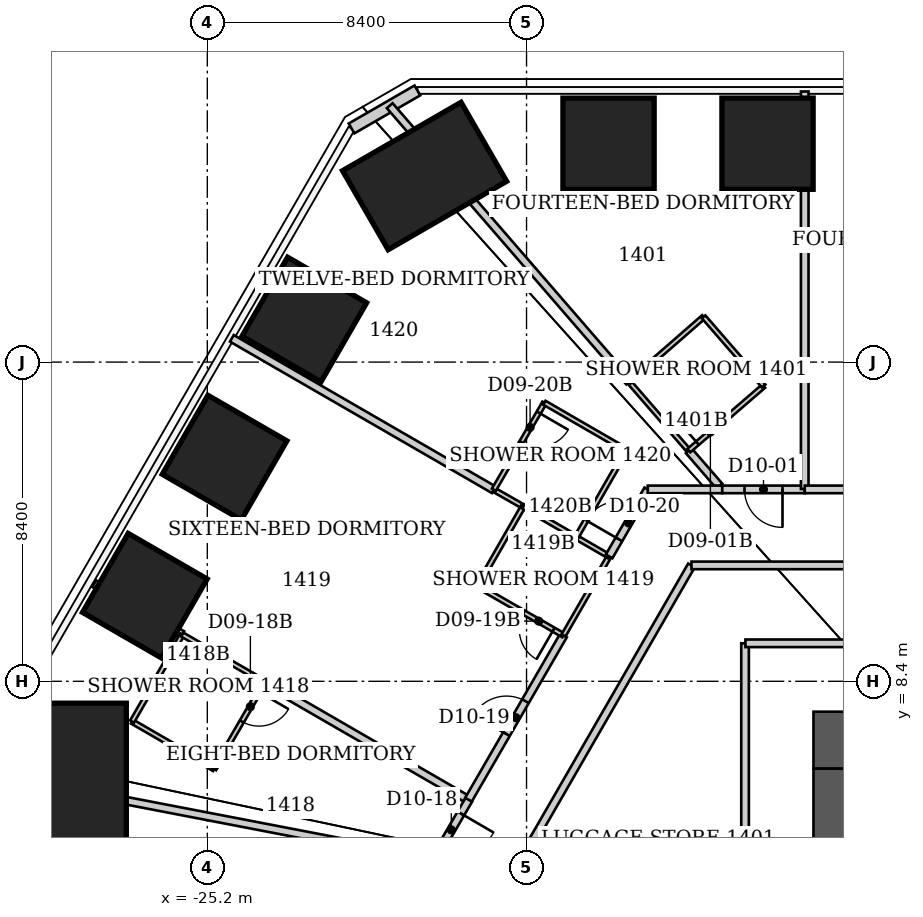
"""IFC4 building model, lengths in metres.
Left out: names, types, materials, properties, quantities, classifications, styles, units other than length and angle.
Written with IfcOpenShell. Run it as: python <this file> out.ifc"""

import sys

from ifc_helpers import new_model, si_unit, direction, frame, frame_2d, origin, origin_2d, place, context, subcontext, project, spatial, rectangle, extrude, element, fill, save


model = new_model("IFC4")
c1 = context("Model", 3, precision=1e-05, world=origin(), true_north=direction((0.0, 1.0)))
c2 = subcontext(c1, "Body", "Model", "MODEL_VIEW")
j1 = project(units=[si_unit("LENGTHUNIT", "METRE"), si_unit("PLANEANGLEUNIT", "RADIAN")], contexts=[c1])
p1 = place(None, origin())
s1 = spatial("IfcSite", under=j1, at=p1, CompositionType="ELEMENT")
p2 = place(p1, origin())
s2 = spatial("IfcBuilding", under=s1, at=p2, CompositionType="ELEMENT")
p3 = place(p2, frame((0.0, 0.0, 61.0)))
s3 = spatial("IfcBuildingStorey", under=s2, at=p3, CompositionType="ELEMENT", Elevation=61.0)
p4 = place(p3, frame((-14.642, 22.546, 0.0), z_axis=(0.0238126955, -0.036713913278, 0.999042063231), x_axis=(0.001457588232, 0.999325647249, 0.036689592354)))
e1 = element("IfcColumn", 1, at=p4, inside=s3, PredefinedType="COLUMN", context=c2, shape_type="SweptSolid", body=[
    extrude(rectangle(XDim=2.4, YDim=2.4, at=origin_2d()), origin(), (0.0, 0.0, 1.0), 3.804),
])
p5 = place(p3, frame((-10.459, 22.547, 0.0), z_axis=(0.017011470786, -0.036654904976, 0.999183180304), x_axis=(0.000443785294, 0.99932796694, 0.036652660843)))
e2 = element("IfcColumn", 2, at=p5, inside=s3, PredefinedType="COLUMN", context=c2, shape_type="SweptSolid", body=[
    extrude(rectangle(XDim=2.4, YDim=2.4, at=origin_2d()), origin(), (0.0, 0.0, 1.0), 3.803),
])
p6 = place(p3, frame((-28.531, 6.024, 0.0), z_axis=(0.046846312306, -0.009882646706, 0.998853220607), x_axis=(-0.998902095057, -0.000629521583, 0.04684237604)))
e3 = element("IfcColumn", 3, at=p6, inside=s3, PredefinedType="COLUMN", context=c2, shape_type="SweptSolid", body=[
    extrude(rectangle(XDim=2.4, YDim=3.6, at=origin_2d()), origin(), (0.0, 0.0, 1.0), 3.804),
])
p7 = place(p3, frame((-26.844, 10.653, 0.0), z_axis=(0.043127320452, -0.017071231012, 0.998923724467), x_axis=(-0.865394297081, 0.498985805563, 0.045889829227)))
e4 = element("IfcColumn", 4, at=p7, inside=s3, PredefinedType="COLUMN", context=c2, shape_type="SweptSolid", body=[
    extrude(rectangle(XDim=2.4, YDim=2.4, at=origin_2d()), origin(), (0.0, 0.0, 1.0), 3.804),
])
p8 = place(p3, frame((-24.746, 14.287, 0.0), z_axis=(0.039726869437, -0.02291194247, 0.998947855865), x_axis=(-0.865344046472, 0.499075645542, 0.045860454239)))
e5 = element("IfcColumn", 5, at=p8, inside=s3, PredefinedType="COLUMN", context=c2, shape_type="SweptSolid", body=[
    extrude(rectangle(XDim=2.4, YDim=2.4, at=origin_2d()), origin(), (0.0, 0.0, 1.0), 3.804),
])
p9 = place(p3, frame((-22.647, 17.921, 0.0), z_axis=(0.036388620428, -0.028815680022, 0.998922181598), x_axis=(-0.865087115008, 0.499515154746, 0.045922691853)))
e6 = element("IfcColumn", 6, at=p9, inside=s3, PredefinedType="COLUMN", context=c2, shape_type="SweptSolid", body=[
    extrude(rectangle(XDim=2.4, YDim=2.4, at=origin_2d()), origin(), (0.0, 0.0, 1.0), 3.804),
])
p10 = place(p3, frame((-19.482, 21.697, 0.0), z_axis=(0.031958207844, -0.035616075007, 0.998854427909), x_axis=(-0.498742821138, 0.865484661248, 0.046817726432)))
e7 = element("IfcColumn", 7, at=p10, inside=s3, PredefinedType="COLUMN", context=c2, shape_type="SweptSolid", body=[
    extrude(rectangle(XDim=2.4, YDim=3.6, at=origin_2d()), origin(), (0.0, 0.0, 1.0), 3.804),
])
p11 = place(p3, frame((-9.25, 6.85, 0.0), z_axis=(0.0, 0.0, 1.0), x_axis=(1.0, 0.0, 0.0)))
e8 = element("IfcWall", 8, at=p11, inside=s3, PredefinedType="SHEAR", context=c2, shape_type="SweptSolid", body=[
    extrude(rectangle(XDim=18.5, YDim=1.5, at=frame_2d((9.25, 0.0))), origin(), (0.0, 0.0, 1.0), 3.8),
])
p12 = place(p3, frame((-8.5, -9.2, 0.0), z_axis=(0.0, 0.0, 1.0), x_axis=(0.0, 1.0, 0.0)))
e9 = element("IfcWall", 9, at=p12, inside=s3, PredefinedType="SHEAR", context=c2, shape_type="SweptSolid", body=[
    extrude(rectangle(XDim=15.3, YDim=1.5, at=frame_2d((7.65, 0.0))), origin(), (0.0, 0.0, 1.0), 3.8),
])
p13 = place(p12, frame((10.7, 0.0, 0.0)))
e10 = element("IfcOpeningElement", 10, at=p13, cuts=e9, PredefinedType="OPENING", context=c2, shape_type="SweptSolid", body=[
    extrude(rectangle(XDim=1.2, YDim=2.2, at=frame_2d((0.6, 1.1))), frame((0.0, 0.75, 0.0), z_axis=(0.0, -1.0, 0.0), x_axis=(1.0, 0.0, 0.0)), (0.0, 0.0, 1.0), 1.5),
])
p14 = place(p3, frame((-21.404, 22.949, 0.0), z_axis=(0.0, 0.0, 1.0), x_axis=(0.866010750942, 0.50002537861, 0.0)))
e11 = element("IfcWall", 11, at=p14, inside=s3, PredefinedType="SOLIDWALL", context=c2, shape_type="SweptSolid", body=[
    extrude(rectangle(XDim=2.0, YDim=0.3, at=frame_2d((1.0, 0.0))), origin(), (0.0, 0.0, 1.0), 3.64),
])
p15 = place(p3, frame((-30.591, 5.884, 0.0), z_axis=(0.0, 0.0, 1.0), x_axis=(0.981983289605, -0.188967772219, 0.0)))
e12 = element("IfcWall", 12, at=p15, inside=s3, PredefinedType="PARTITIONING", context=c2, shape_type="SweptSolid", body=[
    extrude(rectangle(XDim=11.509, YDim=0.2, at=frame_2d((5.754, 0.0))), origin(), (0.0, 0.0, 1.0), 3.64),
])
p16 = place(p3, frame((-28.176, 10.97, 0.0), z_axis=(0.0, 0.0, 1.0), x_axis=(0.865563676017, -0.500798884543, 0.0)))
e13 = element("IfcWall", 13, at=p16, inside=s3, PredefinedType="PARTITIONING", context=c2, shape_type="SweptSolid", body=[
    extrude(rectangle(XDim=2.676, YDim=0.2, at=frame_2d((1.338, 0.0))), origin(), (0.0, 0.0, 1.0), 3.64),
])
p17 = place(p3, frame((-27.18, 7.34, 0.0), z_axis=(0.0, 0.0, 1.0), x_axis=(0.865508881864, -0.500893576935, 0.0)))
e14 = element("IfcWall", 14, at=p17, inside=s3, PredefinedType="PARTITIONING", context=c2, shape_type="SweptSolid", body=[
    extrude(rectangle(XDim=2.496, YDim=0.12, at=frame_2d((1.248, 0.0))), origin(), (0.0, 0.0, 1.0), 3.64),
])
p18 = place(p3, frame((-25.86, 9.63, 0.0), z_axis=(0.0, 0.0, 1.0), x_axis=(-0.499378545839, -0.866383903334, 0.0)))
e15 = element("IfcWall", 15, at=p18, inside=s3, PredefinedType="PARTITIONING", context=c2, shape_type="SweptSolid", body=[
    extrude(rectangle(XDim=2.643, YDim=0.12, at=frame_2d((1.321, 0.0))), origin(), (0.0, 0.0, 1.0), 3.64),
])
p19 = place(p3, frame((-25.86, 9.63, 0.0), z_axis=(0.0, 0.0, 1.0), x_axis=(0.86653430447, -0.499117520406, 0.0)))
e16 = element("IfcWall", 16, at=p19, inside=s3, PredefinedType="PARTITIONING", context=c2, shape_type="SweptSolid", body=[
    extrude(rectangle(XDim=2.504, YDim=0.12, at=frame_2d((1.252, 0.0))), origin(), (0.0, 0.0, 1.0), 3.64),
])
p20 = place(p3, frame((-25.02, 6.09, 0.0), z_axis=(0.0, 0.0, 1.0), x_axis=(0.502282305835, 0.864703697948, 0.0)))
e17 = element("IfcWall", 17, at=p20, inside=s3, PredefinedType="PARTITIONING", context=c2, shape_type="SweptSolid", body=[
    extrude(rectangle(XDim=2.648, YDim=0.12, at=frame_2d((1.324, 0.0))), origin(), (0.0, 0.0, 1.0), 3.64),
])
p21 = place(p20, frame((1.448, 0.0, 0.0)))
e18 = element("IfcOpeningElement", 18, at=p21, cuts=e17, PredefinedType="OPENING", context=c2, shape_type="SweptSolid", body=[
    extrude(rectangle(XDim=0.9, YDim=2.03, at=frame_2d((0.45, 1.015))), frame((0.0, 0.06, 0.0), z_axis=(0.0, -1.0, 0.0), x_axis=(1.0, 0.0, 0.0)), (0.0, 0.0, 1.0), 0.12),
])
p22 = place(p3, frame((-24.554, 17.425, 0.0), z_axis=(0.0, 0.0, 1.0), x_axis=(0.865762644918, -0.500454835789, 0.0)))
e19 = element("IfcWall", 19, at=p22, inside=s3, PredefinedType="PARTITIONING", context=c2, shape_type="SweptSolid", body=[
    extrude(rectangle(XDim=7.963, YDim=0.2, at=frame_2d((3.981, 0.0))), origin(), (0.0, 0.0, 1.0), 3.64),
])
p23 = place(p3, frame((-23.69, 8.38, 0.0), z_axis=(0.0, 0.0, 1.0), x_axis=(0.865658018331, -0.500635791068, 0.0)))
e20 = element("IfcWall", 20, at=p23, inside=s3, PredefinedType="PARTITIONING", context=c2, shape_type="SweptSolid", body=[
    extrude(rectangle(XDim=6.177, YDim=0.2, at=frame_2d((3.088, 0.0))), origin(), (0.0, 0.0, 1.0), 3.64),
])
p24 = place(p3, frame((-20.4, 23.547, 0.0), z_axis=(0.0, 0.0, 1.0), x_axis=(0.654910244559, -0.755706670323, 0.0)))
e21 = element("IfcWall", 21, at=p24, inside=s3, PredefinedType="PARTITIONING", context=c2, shape_type="SweptSolid", body=[
    extrude(rectangle(XDim=9.618, YDim=0.2, at=frame_2d((4.809, 0.0))), origin(), (0.0, 0.0, 1.0), 3.64),
])
p25 = place(p3, frame((-18.33, 5.28, 0.0), z_axis=(0.0, 0.0, 1.0), x_axis=(0.500685921526, 0.865629024459, 0.0)))
e22 = element("IfcWall", 22, at=p25, inside=s3, PredefinedType="PARTITIONING", context=c2, shape_type="SweptSolid", body=[
    extrude(rectangle(XDim=5.0, YDim=0.2, at=frame_2d((2.5, 0.0))), origin(), (0.0, 0.0, 1.0), 3.64),
])
p26 = place(p25, frame((2.0, 0.0, 0.0)))
e23 = element("IfcOpeningElement", 23, at=p26, cuts=e22, PredefinedType="OPENING", context=c2, shape_type="SweptSolid", body=[
    extrude(rectangle(XDim=1.0, YDim=2.13, at=frame_2d((0.5, 1.065))), frame((0.0, 0.1, 0.0), z_axis=(0.0, -1.0, 0.0), x_axis=(1.0, 0.0, 0.0)), (0.0, 0.0, 1.0), 0.2),
])
p27 = place(p3, frame((-18.32, 5.28, 0.0), z_axis=(0.0, 0.0, 1.0), x_axis=(-0.503140236709, -0.864204780249, 0.0)))
e24 = element("IfcWall", 24, at=p27, inside=s3, PredefinedType="PARTITIONING", context=c2, shape_type="SweptSolid", body=[
    extrude(rectangle(XDim=1.828, YDim=0.2, at=frame_2d((0.914, 0.0))), origin(), (0.0, 0.0, 1.0), 3.64),
])
p28 = place(p27, frame((0.414, 0.0, 0.0)))
e25 = element("IfcOpeningElement", 25, at=p28, cuts=e24, PredefinedType="OPENING", context=c2, shape_type="SweptSolid", body=[
    extrude(rectangle(XDim=1.0, YDim=2.13, at=frame_2d((0.5, 1.065))), frame((0.0, 0.1, 0.0), z_axis=(0.0, -1.0, 0.0), x_axis=(1.0, 0.0, 0.0)), (0.0, 0.0, 1.0), 0.2),
])
p29 = place(p3, frame((-18.09, 10.91, 0.0), z_axis=(0.0, 0.0, 1.0), x_axis=(0.866856728041, -0.498557331759, 0.0)))
e26 = element("IfcWall", 26, at=p29, inside=s3, PredefinedType="PARTITIONING", context=c2, shape_type="SweptSolid", body=[
    extrude(rectangle(XDim=2.607, YDim=0.12, at=frame_2d((1.304, 0.0))), origin(), (0.0, 0.0, 1.0), 3.64),
])
p30 = place(p29, frame((1.407, 0.0, 0.0)))
e27 = element("IfcOpeningElement", 27, at=p30, cuts=e26, PredefinedType="OPENING", context=c2, shape_type="SweptSolid", body=[
    extrude(rectangle(XDim=0.9, YDim=2.03, at=frame_2d((0.45, 1.015))), frame((0.0, 0.06, 0.0), z_axis=(0.0, -1.0, 0.0), x_axis=(1.0, 0.0, 0.0)), (0.0, 0.0, 1.0), 0.12),
])
p31 = place(p3, frame((-17.66, 13.44, 0.0), z_axis=(0.0, 0.0, 1.0), x_axis=(0.86820924967, -0.49619824545, 0.0)))
e28 = element("IfcWall", 28, at=p31, inside=s3, PredefinedType="PARTITIONING", context=c2, shape_type="SweptSolid", body=[
    extrude(rectangle(XDim=0.887, YDim=0.12, at=frame_2d((0.443, 0.0))), origin(), (0.0, 0.0, 1.0), 3.64),
])
p32 = place(p3, frame((-17.3, 3.06, 0.0), z_axis=(0.0, 0.0, 1.0), x_axis=(0.499704269421, 0.866196076603, 0.0)))
e29 = element("IfcWall", 29, at=p32, inside=s3, PredefinedType="PARTITIONING", context=c2, shape_type="SweptSolid", body=[
    extrude(rectangle(XDim=9.686, YDim=0.2, at=frame_2d((4.843, 0.0))), origin(), (0.0, 0.0, 1.0), 3.64),
])
p33 = place(p3, frame((-16.89, 13.0, 0.0), z_axis=(0.0, 0.0, 1.0), x_axis=(-0.497970509195, -0.867193964446, 0.0)))
e30 = element("IfcWall", 30, at=p33, inside=s3, PredefinedType="PARTITIONING", context=c2, shape_type="SweptSolid", body=[
    extrude(rectangle(XDim=2.41, YDim=0.12, at=frame_2d((1.205, 0.0))), origin(), (0.0, 0.0, 1.0), 3.64),
])
p34 = place(p3, frame((-16.89, 13.0, 0.0), z_axis=(0.0, 0.0, 1.0), x_axis=(0.864822777425, -0.502077248685, 0.0)))
e31 = element("IfcWall", 31, at=p34, inside=s3, PredefinedType="PARTITIONING", context=c2, shape_type="SweptSolid", body=[
    extrude(rectangle(XDim=1.617, YDim=0.12, at=frame_2d((0.809, 0.0))), origin(), (0.0, 0.0, 1.0), 3.64),
])
p35 = place(p3, frame((-16.33, 15.73, 0.0), z_axis=(0.0, 0.0, 1.0), x_axis=(-0.502173326652, -0.864766991738, 0.0)))
e32 = element("IfcWall", 32, at=p35, inside=s3, PredefinedType="PARTITIONING", context=c2, shape_type="SweptSolid", body=[
    extrude(rectangle(XDim=2.648, YDim=0.12, at=frame_2d((1.324, 0.0))), origin(), (0.0, 0.0, 1.0), 3.64),
])
p36 = place(p35, frame((0.3, 0.0, 0.0)))
e33 = element("IfcOpeningElement", 33, at=p36, cuts=e32, PredefinedType="OPENING", context=c2, shape_type="SweptSolid", body=[
    extrude(rectangle(XDim=0.9, YDim=2.03, at=frame_2d((0.45, 1.015))), frame((0.0, 0.06, 0.0), z_axis=(0.0, -1.0, 0.0), x_axis=(1.0, 0.0, 0.0)), (0.0, 0.0, 1.0), 0.12),
])
p37 = place(p3, frame((-15.827, 9.608, 0.0), z_axis=(0.0, 0.0, 1.0), x_axis=(0.499737123639, 0.866177122335, 0.0)))
e34 = element("IfcWall", 34, at=p37, inside=s3, PredefinedType="PARTITIONING", context=c2, shape_type="SweptSolid", body=[
    extrude(rectangle(XDim=2.401, YDim=0.12, at=frame_2d((1.201, 0.0))), origin(), (0.0, 0.0, 1.0), 3.64),
])
p38 = place(p3, frame((-15.491, 12.188, 0.0), z_axis=(0.0, 0.0, 1.0), x_axis=(0.865633452576, -0.500678265737, 0.0)))
e35 = element("IfcWall", 35, at=p38, inside=s3, PredefinedType="PARTITIONING", context=c2, shape_type="SweptSolid", body=[
    extrude(rectangle(XDim=0.995, YDim=0.12, at=frame_2d((0.497, 0.0))), origin(), (0.0, 0.0, 1.0), 3.64),
])
p39 = place(p3, frame((-15.49, 12.19, 0.0), z_axis=(0.0, 0.0, 1.0), x_axis=(0.499407914056, 0.866366975004, 0.0)))
e36 = element("IfcWall", 36, at=p39, inside=s3, PredefinedType="PARTITIONING", context=c2, shape_type="SweptSolid", body=[
    extrude(rectangle(XDim=2.643, YDim=0.12, at=frame_2d((1.322, 0.0))), origin(), (0.0, 0.0, 1.0), 3.64),
])
p40 = place(p3, frame((-14.627, 11.688, 0.0), z_axis=(0.0, 0.0, 1.0), x_axis=(0.49975362313, 0.866167602816, 0.0)))
e37 = element("IfcWall", 37, at=p40, inside=s3, PredefinedType="PARTITIONING", context=c2, shape_type="SweptSolid", body=[
    extrude(rectangle(XDim=2.034, YDim=0.2, at=frame_2d((1.017, 0.0))), origin(), (0.0, 0.0, 1.0), 3.64),
])
p41 = place(p40, frame((0.517, 0.0, 0.0)))
e38 = element("IfcOpeningElement", 38, at=p41, cuts=e37, PredefinedType="OPENING", context=c2, shape_type="SweptSolid", body=[
    extrude(rectangle(XDim=1.0, YDim=2.13, at=frame_2d((0.5, 1.065))), frame((0.0, 0.1, 0.0), z_axis=(0.0, -1.0, 0.0), x_axis=(1.0, 0.0, 0.0)), (0.0, 0.0, 1.0), 0.2),
])
p42 = place(p3, frame((-14.17, 14.48, 0.0), z_axis=(0.0, 0.0, 1.0), x_axis=(-0.865533423938, 0.500851167559, 0.0)))
e39 = element("IfcWall", 39, at=p42, inside=s3, PredefinedType="PARTITIONING", context=c2, shape_type="SweptSolid", body=[
    extrude(rectangle(XDim=2.496, YDim=0.12, at=frame_2d((1.248, 0.0))), origin(), (0.0, 0.0, 1.0), 3.64),
])
p43 = place(p3, frame((-14.101, 16.279, 0.0), z_axis=(0.0, 0.0, 1.0), x_axis=(0.654868469202, -0.755742871647, 0.0)))
e40 = element("IfcWall", 40, at=p43, inside=s3, PredefinedType="PARTITIONING", context=c2, shape_type="SweptSolid", body=[
    extrude(rectangle(XDim=2.396, YDim=0.12, at=frame_2d((1.198, 0.0))), origin(), (0.0, 0.0, 1.0), 3.64),
])
p44 = place(p3, frame((-12.532, 14.468, 0.0), z_axis=(0.0, 0.0, 1.0), x_axis=(0.654877937884, -0.755734666714, 0.0)))
e41 = element("IfcWall", 41, at=p44, inside=s3, PredefinedType="PARTITIONING", context=c2, shape_type="SweptSolid", body=[
    extrude(rectangle(XDim=1.237, YDim=0.2, at=frame_2d((0.619, 0.0))), origin(), (0.0, 0.0, 1.0), 3.64),
])
p45 = place(p3, frame((-12.53, 14.47, 0.0), z_axis=(0.0, 0.0, 1.0), x_axis=(0.757086659925, 0.653314464377, 0.0)))
e42 = element("IfcWall", 42, at=p45, inside=s3, PredefinedType="PARTITIONING", context=c2, shape_type="SweptSolid", body=[
    extrude(rectangle(XDim=2.602, YDim=0.12, at=frame_2d((1.301, 0.0))), origin(), (0.0, 0.0, 1.0), 3.64),
])
p46 = place(p45, frame((0.3, 0.0, 0.0)))
e43 = element("IfcOpeningElement", 43, at=p46, cuts=e42, PredefinedType="OPENING", context=c2, shape_type="SweptSolid", body=[
    extrude(rectangle(XDim=0.9, YDim=2.03, at=frame_2d((0.45, 1.015))), frame((0.0, 0.06, 0.0), z_axis=(0.0, -1.0, 0.0), x_axis=(1.0, 0.0, 0.0)), (0.0, 0.0, 1.0), 0.12),
])
p47 = place(p3, frame((-12.46, 11.45, 0.0), z_axis=(0.0, 0.0, 1.0), x_axis=(1.0, 0.0, 0.0)))
e44 = element("IfcWall", 44, at=p47, inside=s3, PredefinedType="PARTITIONING", context=c2, shape_type="SweptSolid", body=[
    extrude(rectangle(XDim=4.1, YDim=0.2, at=frame_2d((2.05, 0.0))), origin(), (0.0, 0.0, 1.0), 3.64),
])
p48 = place(p3, frame((-12.14, 17.99, 0.0), z_axis=(0.0, 0.0, 1.0), x_axis=(-0.753570046386, -0.657367617996, 0.0)))
e45 = element("IfcWall", 45, at=p48, inside=s3, PredefinedType="PARTITIONING", context=c2, shape_type="SweptSolid", body=[
    extrude(rectangle(XDim=2.601, YDim=0.12, at=frame_2d((1.301, 0.0))), origin(), (0.0, 0.0, 1.0), 3.64),
])
p49 = place(p3, frame((-11.65, 13.45, 0.0), z_axis=(0.0, 0.0, 1.0), x_axis=(-1.0, 0.0, 0.0)))
e46 = element("IfcWall", 46, at=p49, inside=s3, PredefinedType="PARTITIONING", context=c2, shape_type="SweptSolid", body=[
    extrude(rectangle(XDim=1.96, YDim=0.2, at=frame_2d((0.98, 0.0))), origin(), (0.0, 0.0, 1.0), 3.64),
])
p50 = place(p3, frame((-11.05, 9.4, 0.0), z_axis=(0.0, 0.0, 1.0), x_axis=(0.0, -1.0, 0.0)))
e47 = element("IfcWall", 47, at=p50, inside=s3, PredefinedType="PARTITIONING", context=c2, shape_type="SweptSolid", body=[
    extrude(rectangle(XDim=17.16, YDim=0.2, at=frame_2d((8.58, 0.0))), origin(), (0.0, 0.0, 1.0), 3.64),
])
p51 = place(p50, frame((8.03, 0.0, 0.0)))
e48 = element("IfcOpeningElement", 48, at=p51, cuts=e47, PredefinedType="OPENING", context=c2, shape_type="SweptSolid", body=[
    extrude(rectangle(XDim=1.1, YDim=2.2, at=frame_2d((0.55, 1.1))), frame((0.0, 0.1, 0.0), z_axis=(0.0, -1.0, 0.0), x_axis=(1.0, 0.0, 0.0)), (0.0, 0.0, 1.0), 0.2),
])
p52 = place(p3, frame((-10.56, 16.17, 0.0), z_axis=(0.0, 0.0, 1.0), x_axis=(-0.65550883331, 0.755187506155, 0.0)))
e49 = element("IfcWall", 49, at=p52, inside=s3, PredefinedType="PARTITIONING", context=c2, shape_type="SweptSolid", body=[
    extrude(rectangle(XDim=2.41, YDim=0.12, at=frame_2d((1.205, 0.0))), origin(), (0.0, 0.0, 1.0), 3.64),
])
p53 = place(p3, frame((-9.48, 13.45, 0.0), z_axis=(0.0, 0.0, 1.0), x_axis=(-1.0, 0.0, 0.0)))
e50 = element("IfcWall", 50, at=p53, inside=s3, PredefinedType="PARTITIONING", context=c2, shape_type="SweptSolid", body=[
    extrude(rectangle(XDim=2.17, YDim=0.2, at=frame_2d((1.085, 0.0))), origin(), (0.0, 0.0, 1.0), 3.64),
])
p54 = place(p53, frame((0.585, 0.0, 0.0)))
e51 = element("IfcOpeningElement", 51, at=p54, cuts=e50, PredefinedType="OPENING", context=c2, shape_type="SweptSolid", body=[
    extrude(rectangle(XDim=1.0, YDim=2.13, at=frame_2d((0.5, 1.065))), frame((0.0, 0.1, 0.0), z_axis=(0.0, -1.0, 0.0), x_axis=(1.0, 0.0, 0.0)), (0.0, 0.0, 1.0), 0.2),
])
p55 = place(p3, frame((-9.48, 23.92, 0.0), z_axis=(0.0, 0.0, 1.0), x_axis=(0.0, -1.0, 0.0)))
e52 = element("IfcWall", 52, at=p55, inside=s3, PredefinedType="PARTITIONING", context=c2, shape_type="SweptSolid", body=[
    extrude(rectangle(XDim=10.46, YDim=0.2, at=frame_2d((5.23, 0.0))), origin(), (0.0, 0.0, 1.0), 3.64),
])
p56 = place(p3, frame((-8.36, 9.4, 0.0), z_axis=(0.0, 0.0, 1.0), x_axis=(-1.0, 0.0, 0.0)))
e53 = element("IfcWall", 53, at=p56, inside=s3, PredefinedType="PARTITIONING", context=c2, shape_type="SweptSolid", body=[
    extrude(rectangle(XDim=2.68, YDim=0.2, at=frame_2d((1.34, 0.0))), origin(), (0.0, 0.0, 1.0), 3.64),
])
p57 = place(p3, frame((-4.64, 13.45, 0.0), z_axis=(0.0, 0.0, 1.0), x_axis=(-1.0, 0.0, 0.0)))
e54 = element("IfcWall", 54, at=p57, inside=s3, PredefinedType="PARTITIONING", context=c2, shape_type="SweptSolid", body=[
    extrude(rectangle(XDim=4.84, YDim=0.2, at=frame_2d((2.42, 0.0))), origin(), (0.0, 0.0, 1.0), 3.64),
])
p58 = place(p57, frame((1.92, 0.0, 0.0)))
e55 = element("IfcOpeningElement", 55, at=p58, cuts=e54, PredefinedType="OPENING", context=c2, shape_type="SweptSolid", body=[
    extrude(rectangle(XDim=1.0, YDim=2.13, at=frame_2d((0.5, 1.065))), frame((0.0, 0.1, 0.0), z_axis=(0.0, -1.0, 0.0), x_axis=(1.0, 0.0, 0.0)), (0.0, 0.0, 1.0), 0.2),
])
p59 = place(p54, origin())
e56 = element("IfcDoor", 56, at=p59, inside=s3, OperationType="SINGLE_SWING_LEFT", PredefinedType="DOOR", context=c2, shape_type="SweptSolid", body=[
    extrude(rectangle(XDim=1.0, YDim=2.13, at=frame_2d((0.5, 1.065))), frame((0.0, 0.025, 0.0), z_axis=(0.0, -1.0, 0.0), x_axis=(1.0, 0.0, 0.0)), (0.0, 0.0, 1.0), 0.05),
])
fill(e51, e56)
p60 = place(p46, origin())
e57 = element("IfcDoor", 57, at=p60, inside=s3, OperationType="SINGLE_SWING_LEFT", PredefinedType="DOOR", context=c2, shape_type="SweptSolid", body=[
    extrude(rectangle(XDim=0.9, YDim=2.03, at=frame_2d((0.45, 1.015))), frame((0.0, 0.025, 0.0), z_axis=(0.0, -1.0, 0.0), x_axis=(1.0, 0.0, 0.0)), (0.0, 0.0, 1.0), 0.05),
])
fill(e43, e57)
p61 = place(p28, origin())
e58 = element("IfcDoor", 58, at=p61, inside=s3, OperationType="SINGLE_SWING_LEFT", PredefinedType="DOOR", context=c2, shape_type="SweptSolid", body=[
    extrude(rectangle(XDim=1.0, YDim=2.13, at=frame_2d((0.5, 1.065))), frame((0.0, 0.025, 0.0), z_axis=(0.0, -1.0, 0.0), x_axis=(1.0, 0.0, 0.0)), (0.0, 0.0, 1.0), 0.05),
])
fill(e25, e58)
p62 = place(p21, origin())
e59 = element("IfcDoor", 59, at=p62, inside=s3, OperationType="SINGLE_SWING_RIGHT", PredefinedType="DOOR", context=c2, shape_type="SweptSolid", body=[
    extrude(rectangle(XDim=0.9, YDim=2.03, at=frame_2d((0.45, 1.015))), frame((0.0, 0.025, 0.0), z_axis=(0.0, -1.0, 0.0), x_axis=(1.0, 0.0, 0.0)), (0.0, 0.0, 1.0), 0.05),
])
fill(e18, e59)
p63 = place(p26, origin())
e60 = element("IfcDoor", 60, at=p63, inside=s3, OperationType="SINGLE_SWING_LEFT", PredefinedType="DOOR", context=c2, shape_type="SweptSolid", body=[
    extrude(rectangle(XDim=1.0, YDim=2.13, at=frame_2d((0.5, 1.065))), frame((0.0, 0.025, 0.0), z_axis=(0.0, -1.0, 0.0), x_axis=(1.0, 0.0, 0.0)), (0.0, 0.0, 1.0), 0.05),
])
fill(e23, e60)
p64 = place(p30, origin())
e61 = element("IfcDoor", 61, at=p64, inside=s3, OperationType="SINGLE_SWING_RIGHT", PredefinedType="DOOR", context=c2, shape_type="SweptSolid", body=[
    extrude(rectangle(XDim=0.9, YDim=2.03, at=frame_2d((0.45, 1.015))), frame((0.0, 0.025, 0.0), z_axis=(0.0, -1.0, 0.0), x_axis=(1.0, 0.0, 0.0)), (0.0, 0.0, 1.0), 0.05),
])
fill(e27, e61)
p65 = place(p41, origin())
e62 = element("IfcDoor", 62, at=p65, inside=s3, OperationType="SINGLE_SWING_LEFT", PredefinedType="DOOR", context=c2, shape_type="SweptSolid", body=[
    extrude(rectangle(XDim=1.0, YDim=2.13, at=frame_2d((0.5, 1.065))), frame((0.0, 0.025, 0.0), z_axis=(0.0, -1.0, 0.0), x_axis=(1.0, 0.0, 0.0)), (0.0, 0.0, 1.0), 0.05),
])
fill(e38, e62)
p66 = place(p36, origin())
e63 = element("IfcDoor", 63, at=p66, inside=s3, OperationType="SINGLE_SWING_LEFT", PredefinedType="DOOR", context=c2, shape_type="SweptSolid", body=[
    extrude(rectangle(XDim=0.9, YDim=2.03, at=frame_2d((0.45, 1.015))), frame((0.0, 0.025, 0.0), z_axis=(0.0, -1.0, 0.0), x_axis=(1.0, 0.0, 0.0)), (0.0, 0.0, 1.0), 0.05),
])
fill(e33, e63)
save(model, sys.argv[1])
